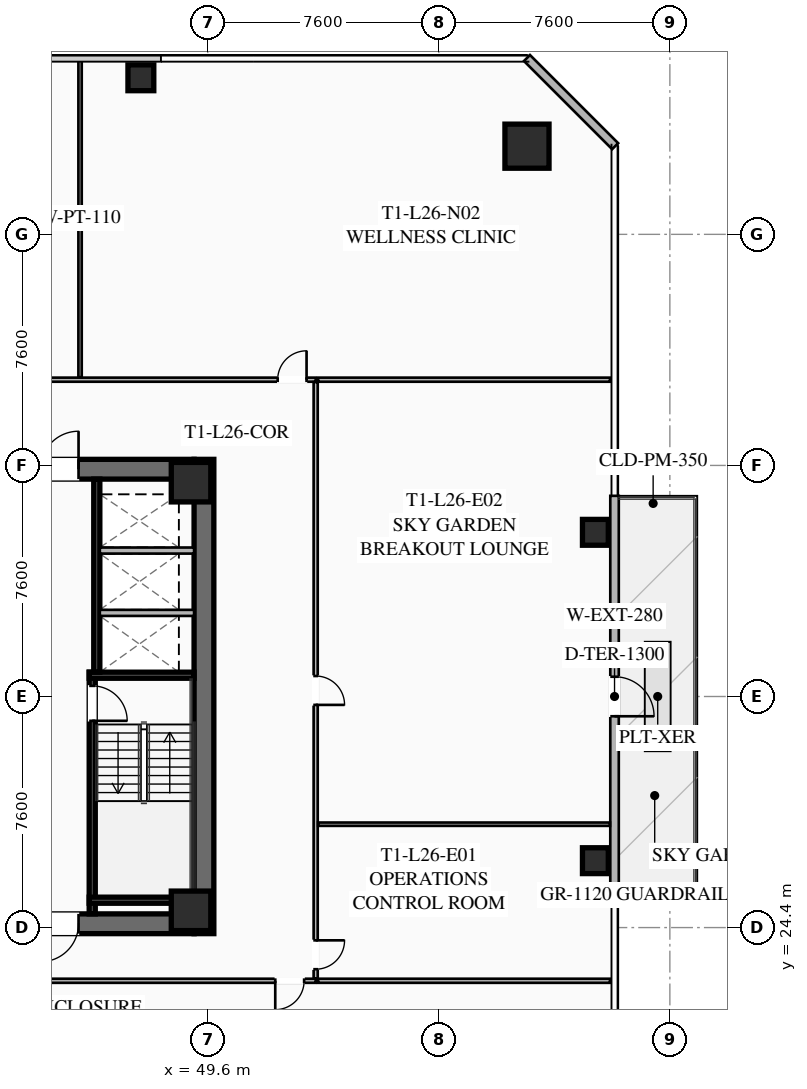
"""IFC4 building model, lengths in metres.
Left out: names, types, materials, properties, quantities, classifications, styles, units other than length and angle.
Written with IfcOpenShell. Run it as: python <this file> out.ifc"""

import sys

from ifc_helpers import new_model, si_unit, direction, frame, frame_2d, origin, origin_2d, place, context, subcontext, project, spatial, rectangle, hollow_rectangle, extrude, element, fill, save


model = new_model("IFC4")
c1 = context("Model", 3, precision=1e-05, world=origin(), true_north=direction((0.0, 1.0)))
c2 = subcontext(c1, "Body", "Model", "MODEL_VIEW")
j1 = project(units=[si_unit("LENGTHUNIT", "METRE"), si_unit("PLANEANGLEUNIT", "RADIAN")], contexts=[c1])
p1 = place(None, origin())
s1 = spatial("IfcSite", under=j1, at=p1, CompositionType="ELEMENT")
p2 = place(p1, origin())
s2 = spatial("IfcBuilding", under=s1, at=p2, CompositionType="ELEMENT")
p3 = place(p2, frame((0.0, 0.0, 99.15)))
s3 = spatial("IfcBuildingStorey", under=s2, at=p3, CompositionType="ELEMENT", Elevation=99.15)
p4 = place(p3, frame((49.475, 39.8, 0.0), z_axis=(0.0, 0.0, 1.0), x_axis=(0.0, -1.0, 0.0)))
e1 = element("IfcWall", 1, at=p4, inside=s3, PredefinedType="SHEAR", context=c2, shape_type="SweptSolid", body=[
    extrude(rectangle(XDim=15.6, YDim=0.65, at=frame_2d((7.8, 0.0))), origin(), (0.0, 0.0, 1.0), 3.55),
])
p5 = place(p3, frame((49.15, 24.525, 0.0), z_axis=(0.0, 0.0, 1.0), x_axis=(-1.0, 0.0, 0.0)))
e2 = element("IfcWall", 2, at=p5, inside=s3, PredefinedType="SHEAR", context=c2, shape_type="SweptSolid", body=[
    extrude(rectangle(XDim=14.3, YDim=0.65, at=frame_2d((7.15, 0.0))), origin(), (0.0, 0.0, 1.0), 3.55),
])
p6 = place(p5, frame((8.85, 0.0, 0.0)))
e3 = element("IfcOpeningElement", 3, at=p6, cuts=e2, PredefinedType="OPENING", context=c2, shape_type="SweptSolid", body=[
    extrude(rectangle(XDim=1.25, YDim=2.25, at=frame_2d((0.625, 1.125))), frame((0.0, 0.335, 0.0), z_axis=(0.0, -1.0, 0.0), x_axis=(1.0, 0.0, 0.0)), (0.0, 0.0, 1.0), 0.67),
])
p7 = place(p5, frame((3.8, 0.0, 0.0)))
e4 = element("IfcOpeningElement", 4, at=p7, cuts=e2, PredefinedType="OPENING", context=c2, shape_type="SweptSolid", body=[
    extrude(rectangle(XDim=1.25, YDim=2.25, at=frame_2d((0.625, 1.125))), frame((0.0, 0.335, 0.0), z_axis=(0.0, -1.0, 0.0), x_axis=(1.0, 0.0, 0.0)), (0.0, 0.0, 1.0), 0.67),
])
p8 = place(p3, frame((34.85, 39.475, 0.0), z_axis=(0.0, 0.0, 1.0), x_axis=(1.0, 0.0, 0.0)))
e5 = element("IfcWall", 5, at=p8, inside=s3, PredefinedType="SHEAR", context=c2, shape_type="SweptSolid", body=[
    extrude(rectangle(XDim=14.3, YDim=0.65, at=frame_2d((7.15, 0.0))), origin(), (0.0, 0.0, 1.0), 3.55),
])
p9 = place(p8, frame((4.2, 0.0, 0.0)))
e6 = element("IfcOpeningElement", 6, at=p9, cuts=e5, PredefinedType="OPENING", context=c2, shape_type="SweptSolid", body=[
    extrude(rectangle(XDim=1.25, YDim=2.25, at=frame_2d((0.625, 1.125))), frame((0.0, 0.335, 0.0), z_axis=(0.0, -1.0, 0.0), x_axis=(1.0, 0.0, 0.0)), (0.0, 0.0, 1.0), 0.67),
])
p10 = place(p8, frame((9.25, 0.0, 0.0)))
e7 = element("IfcOpeningElement", 7, at=p10, cuts=e5, PredefinedType="OPENING", context=c2, shape_type="SweptSolid", body=[
    extrude(rectangle(XDim=1.25, YDim=2.25, at=frame_2d((0.625, 1.125))), frame((0.0, 0.335, 0.0), z_axis=(0.0, -1.0, 0.0), x_axis=(1.0, 0.0, 0.0)), (0.0, 0.0, 1.0), 0.67),
])
for number, where, z_axis, x_axis in (
    (8, (49.05, 24.95, 0.0), (0.0, 0.0, 1.0), (1.0, 0.0, 0.0)),
    (9, (49.05, 39.05, 0.0), (0.0, 0.0, 1.0), (1.0, 0.0, 0.0)),
):
    element("IfcColumn", number, at=place(p3, frame(where, z_axis=z_axis, x_axis=x_axis)), inside=s3, PredefinedType="COLUMN", context=c2, shape_type="SweptSolid", body=[
        extrude(hollow_rectangle(XDim=1.3, YDim=1.3, WallThickness=0.05, at=origin_2d()), origin(), (0.0, 0.0, 1.0), 3.35),
    ])
p11 = place(p3, frame((60.1, 50.1, 0.0), z_axis=(0.0, 0.0, 1.0), x_axis=(1.0, 0.0, 0.0)))
e10 = element("IfcColumn", 10, at=p11, inside=s3, PredefinedType="COLUMN", context=c2, shape_type="SweptSolid", body=[
    extrude(hollow_rectangle(XDim=1.45, YDim=1.45, WallThickness=0.055, at=origin_2d()), origin(), (0.0, 0.0, 1.0), 3.35),
])
for number, where, z_axis, x_axis in (
    (11, (62.35, 26.6, 0.0), (0.0, 0.0, 1.0), (1.0, 0.0, 0.0)),
    (12, (62.35, 37.4, 0.0), (0.0, 0.0, 1.0), (1.0, 0.0, 0.0)),
    (13, (47.4, 52.35, 0.0), (0.0, 0.0, 1.0), (1.0, 0.0, 0.0)),
):
    element("IfcColumn", number, at=place(p3, frame(where, z_axis=z_axis, x_axis=x_axis)), inside=s3, PredefinedType="COLUMN", context=c2, shape_type="SweptSolid", body=[
        extrude(hollow_rectangle(XDim=0.85, YDim=0.85, WallThickness=0.035, at=origin_2d()), origin(), (0.0, 0.0, 1.0), 3.35),
    ])
p12 = place(p3, frame((62.98, 38.6, 0.0), z_axis=(0.0, 0.0, 1.0), x_axis=(0.0, -1.0, 0.0)))
e14 = element("IfcWall", 14, at=p12, inside=s3, PredefinedType="SOLIDWALL", context=c2, shape_type="SweptSolid", body=[
    extrude(rectangle(XDim=13.2, YDim=0.28, at=frame_2d((6.6, 0.0))), origin(), (0.0, 0.0, 1.0), 3.35),
])
p13 = place(p12, frame((5.95, 0.0, 0.0)))
e15 = element("IfcOpeningElement", 15, at=p13, cuts=e14, PredefinedType="OPENING", context=c2, shape_type="SweptSolid", body=[
    extrude(rectangle(XDim=1.3, YDim=2.15, at=frame_2d((0.65, 1.075))), frame((0.0, 0.15, 0.0), z_axis=(0.0, -1.0, 0.0), x_axis=(1.0, 0.0, 0.0)), (0.0, 0.0, 1.0), 0.3),
])
p14 = place(p3, frame((60.1, 53.0, 0.0), z_axis=(0.0, 0.0, 1.0), x_axis=(0.707106781187, -0.707106781187, 0.0)))
e16 = element("IfcWall", 16, at=p14, inside=s3, PredefinedType="SOLIDWALL", context=c2, shape_type="SweptSolid", body=[
    extrude(rectangle(XDim=4.101, YDim=0.28, at=frame_2d((2.051, 0.0))), origin(), (0.0, 0.0, 1.0), 3.35),
])
p15 = place(p3, frame((45.8, 32.8, 0.0), z_axis=(0.0, 0.0, 1.0), x_axis=(0.0, -1.0, 0.0)))
e17 = element("IfcWall", 17, at=p15, inside=s3, PredefinedType="SHEAR", context=c2, shape_type="SweptSolid", body=[
    extrude(rectangle(XDim=7.95, YDim=0.2, at=frame_2d((3.975, 0.0))), origin(), (0.0, 0.0, 1.0), 3.35),
])
p16 = place(p15, frame((0.45, 0.0, 0.0)))
e18 = element("IfcOpeningElement", 18, at=p16, cuts=e17, PredefinedType="OPENING", context=c2, shape_type="SweptSolid", body=[
    extrude(rectangle(XDim=1.15, YDim=2.2, at=frame_2d((0.575, 1.1))), frame((0.0, 0.11, 0.0), z_axis=(0.0, -1.0, 0.0), x_axis=(1.0, 0.0, 0.0)), (0.0, 0.0, 1.0), 0.22),
])
for number, where, z_axis, x_axis in (
    (19, (45.7, 32.7, 0.0), (0.0, 0.0, 1.0), (1.0, 0.0, 0.0)),
    (20, (45.7, 25.3, 0.0), (0.0, 0.0, 1.0), (1.0, 0.0, 0.0)),
):
    element("IfcWall", number, at=place(p3, frame(where, z_axis=z_axis, x_axis=x_axis)), inside=s3, PredefinedType="SHEAR", context=c2, shape_type="SweptSolid", body=[
        extrude(rectangle(XDim=3.45, YDim=0.2, at=frame_2d((1.725, 0.0))), origin(), (0.0, 0.0, 1.0), 3.35),
    ])
p17 = place(p3, frame((45.95, 39.15, 0.0), z_axis=(0.0, 0.0, 1.0), x_axis=(0.0, -1.0, 0.0)))
e21 = element("IfcWall", 21, at=p17, inside=s3, PredefinedType="SHEAR", context=c2, shape_type="SweptSolid", body=[
    extrude(rectangle(XDim=6.35, YDim=0.2, at=frame_2d((3.175, 0.0))), origin(), (0.0, 0.0, 1.0), 3.35),
])
for number, where, z_axis, x_axis in (
    (22, (46.05, 34.75, 0.0), (0.0, 0.0, 1.0), (1.0, 0.0, 0.0)),
    (23, (46.05, 36.8, 0.0), (0.0, 0.0, 1.0), (1.0, 0.0, 0.0)),
):
    element("IfcWall", number, at=place(p3, frame(where, z_axis=z_axis, x_axis=x_axis)), inside=s3, PredefinedType="SOLIDWALL", context=c2, shape_type="SweptSolid", body=[
        extrude(rectangle(XDim=3.1, YDim=0.2, at=frame_2d((1.55, 0.0))), origin(), (0.0, 0.0, 1.0), 3.35),
    ])
p18 = place(p3, frame((24.05, 42.42, 0.0), z_axis=(0.0, 0.0, 1.0), x_axis=(1.0, 0.0, 0.0)))
e24 = element("IfcWall", 24, at=p18, inside=s3, PredefinedType="PARTITIONING", context=c2, shape_type="SweptSolid", body=[
    extrude(rectangle(XDim=29.1, YDim=0.135, at=frame_2d((14.55, 0.0))), origin(), (0.0, 0.0, 1.0), 2.703),
])
p19 = place(p18, frame((0.3, 0.0, 0.0)))
e25 = element("IfcOpeningElement", 25, at=p19, cuts=e24, PredefinedType="OPENING", context=c2, shape_type="SweptSolid", body=[
    extrude(rectangle(XDim=0.95, YDim=2.05, at=frame_2d((0.475, 1.025))), frame((0.0, 0.077, 0.0), z_axis=(0.0, -1.0, 0.0), x_axis=(1.0, 0.0, 0.0)), (0.0, 0.0, 1.0), 0.155),
])
p20 = place(p18, frame((27.85, 0.0, 0.0)))
e26 = element("IfcOpeningElement", 26, at=p20, cuts=e24, PredefinedType="OPENING", context=c2, shape_type="SweptSolid", body=[
    extrude(rectangle(XDim=0.95, YDim=2.05, at=frame_2d((0.475, 1.025))), frame((0.0, 0.077, 0.0), z_axis=(0.0, -1.0, 0.0), x_axis=(1.0, 0.0, 0.0)), (0.0, 0.0, 1.0), 0.155),
])
p21 = place(p3, frame((45.4, 42.5, 0.0), z_axis=(0.0, 0.0, 1.0), x_axis=(0.0, 1.0, 0.0)))
e27 = element("IfcWall", 27, at=p21, inside=s3, PredefinedType="PARTITIONING", context=c2, shape_type="SweptSolid", body=[
    extrude(rectangle(XDim=10.48, YDim=0.11, at=frame_2d((5.24, 0.0))), origin(), (0.0, 0.0, 1.0), 2.703),
])
p22 = place(p3, frame((53.15, 22.65, 0.0), z_axis=(0.0, 0.0, 1.0), x_axis=(-1.0, 0.0, 0.0)))
e28 = element("IfcWall", 28, at=p22, inside=s3, PredefinedType="PARTITIONING", context=c2, shape_type="SweptSolid", body=[
    extrude(rectangle(XDim=29.1, YDim=0.135, at=frame_2d((14.55, 0.0))), origin(), (0.0, 0.0, 1.0), 2.703),
])
p23 = place(p22, frame((27.77, 0.0, 0.0)))
e29 = element("IfcOpeningElement", 29, at=p23, cuts=e28, PredefinedType="OPENING", context=c2, shape_type="SweptSolid", body=[
    extrude(rectangle(XDim=0.95, YDim=2.05, at=frame_2d((0.475, 1.025))), frame((0.0, 0.077, 0.0), z_axis=(0.0, -1.0, 0.0), x_axis=(1.0, 0.0, 0.0)), (0.0, 0.0, 1.0), 0.155),
])
p24 = place(p22, frame((0.38, 0.0, 0.0)))
e30 = element("IfcOpeningElement", 30, at=p24, cuts=e28, PredefinedType="OPENING", context=c2, shape_type="SweptSolid", body=[
    extrude(rectangle(XDim=0.95, YDim=2.05, at=frame_2d((0.475, 1.025))), frame((0.0, 0.077, 0.0), z_axis=(0.0, -1.0, 0.0), x_axis=(1.0, 0.0, 0.0)), (0.0, 0.0, 1.0), 0.155),
])
p25 = place(p3, frame((53.15, 42.34, 0.0), z_axis=(0.0, 0.0, 1.0), x_axis=(0.0, -1.0, 0.0)))
e31 = element("IfcWall", 31, at=p25, inside=s3, PredefinedType="PARTITIONING", context=c2, shape_type="SweptSolid", body=[
    extrude(rectangle(XDim=19.61, YDim=0.135, at=frame_2d((9.805, 0.0))), origin(), (0.0, 0.0, 1.0), 2.703),
])
p26 = place(p25, frame((18.36, 0.0, 0.0)))
e32 = element("IfcOpeningElement", 32, at=p26, cuts=e31, PredefinedType="OPENING", context=c2, shape_type="SweptSolid", body=[
    extrude(rectangle(XDim=0.95, YDim=2.05, at=frame_2d((0.475, 1.025))), frame((0.0, 0.077, 0.0), z_axis=(0.0, -1.0, 0.0), x_axis=(1.0, 0.0, 0.0)), (0.0, 0.0, 1.0), 0.155),
])
p27 = place(p25, frame((9.666, 0.0, 0.0)))
e33 = element("IfcOpeningElement", 33, at=p27, cuts=e31, PredefinedType="OPENING", context=c2, shape_type="SweptSolid", body=[
    extrude(rectangle(XDim=0.95, YDim=2.05, at=frame_2d((0.475, 1.025))), frame((0.0, 0.077, 0.0), z_axis=(0.0, -1.0, 0.0), x_axis=(1.0, 0.0, 0.0)), (0.0, 0.0, 1.0), 0.155),
])
for number, where, z_axis, x_axis in (
    (34, (62.83, 42.42, 0.0), (0.0, 0.0, 1.0), (-1.0, 0.0, 0.0)),
    (35, (53.23, 22.65, 0.0), (0.0, 0.0, 1.0), (1.0, 0.0, 0.0)),
):
    element("IfcWall", number, at=place(p3, frame(where, z_axis=z_axis, x_axis=x_axis)), inside=s3, PredefinedType="PARTITIONING", context=c2, shape_type="SweptSolid", body=[
        extrude(rectangle(XDim=9.6, YDim=0.135, at=frame_2d((4.8, 0.0))), origin(), (0.0, 0.0, 1.0), 2.703),
    ])
p28 = place(p3, frame((53.23, 27.8, 0.0), z_axis=(0.0, 0.0, 1.0), x_axis=(1.0, 0.0, 0.0)))
e36 = element("IfcWall", 36, at=p28, inside=s3, PredefinedType="PARTITIONING", context=c2, shape_type="SweptSolid", body=[
    extrude(rectangle(XDim=9.6, YDim=0.11, at=frame_2d((4.8, 0.0))), origin(), (0.0, 0.0, 1.0), 2.703),
])
p29 = place(p13, origin())
e37 = element("IfcDoor", 37, at=p29, inside=s3, OperationType="SINGLE_SWING_RIGHT", PredefinedType="DOOR", context=c2, shape_type="SweptSolid", body=[
    extrude(rectangle(XDim=1.3, YDim=2.15, at=frame_2d((0.65, 1.075))), frame((0.0, 0.025, 0.0), z_axis=(0.0, -1.0, 0.0), x_axis=(1.0, 0.0, 0.0)), (0.0, 0.0, 1.0), 0.05),
])
fill(e15, e37)
p30 = place(p10, origin())
e38 = element("IfcDoor", 38, at=p30, inside=s3, OperationType="SINGLE_SWING_RIGHT", PredefinedType="DOOR", context=c2, shape_type="SweptSolid", body=[
    extrude(rectangle(XDim=1.25, YDim=2.25, at=frame_2d((0.625, 1.125))), frame((0.0, 0.025, 0.0), z_axis=(0.0, -1.0, 0.0), x_axis=(1.0, 0.0, 0.0)), (0.0, 0.0, 1.0), 0.05),
])
fill(e7, e38)
p31 = place(p7, origin())
e39 = element("IfcDoor", 39, at=p31, inside=s3, OperationType="SINGLE_SWING_RIGHT", PredefinedType="DOOR", context=c2, shape_type="SweptSolid", body=[
    extrude(rectangle(XDim=1.25, YDim=2.25, at=frame_2d((0.625, 1.125))), frame((0.0, 0.025, 0.0), z_axis=(0.0, -1.0, 0.0), x_axis=(1.0, 0.0, 0.0)), (0.0, 0.0, 1.0), 0.05),
])
fill(e4, e39)
p32 = place(p16, origin())
e40 = element("IfcDoor", 40, at=p32, inside=s3, OperationType="SINGLE_SWING_RIGHT", PredefinedType="DOOR", context=c2, shape_type="SweptSolid", body=[
    extrude(rectangle(XDim=1.15, YDim=2.2, at=frame_2d((0.575, 1.1))), frame((0.0, 0.025, 0.0), z_axis=(0.0, -1.0, 0.0), x_axis=(1.0, 0.0, 0.0)), (0.0, 0.0, 1.0), 0.05),
])
fill(e18, e40)
p33 = place(p20, origin())
e41 = element("IfcDoor", 41, at=p33, inside=s3, OperationType="SINGLE_SWING_RIGHT", PredefinedType="DOOR", context=c2, shape_type="SweptSolid", body=[
    extrude(rectangle(XDim=0.95, YDim=2.05, at=frame_2d((0.475, 1.025))), frame((0.0, 0.025, 0.0), z_axis=(0.0, -1.0, 0.0), x_axis=(1.0, 0.0, 0.0)), (0.0, 0.0, 1.0), 0.05),
])
fill(e26, e41)
p34 = place(p24, origin())
e42 = element("IfcDoor", 42, at=p34, inside=s3, OperationType="SINGLE_SWING_RIGHT", PredefinedType="DOOR", context=c2, shape_type="SweptSolid", body=[
    extrude(rectangle(XDim=0.95, YDim=2.05, at=frame_2d((0.475, 1.025))), frame((0.0, 0.025, 0.0), z_axis=(0.0, -1.0, 0.0), x_axis=(1.0, 0.0, 0.0)), (0.0, 0.0, 1.0), 0.05),
])
fill(e30, e42)
p35 = place(p26, origin())
e43 = element("IfcDoor", 43, at=p35, inside=s3, OperationType="SINGLE_SWING_LEFT", PredefinedType="DOOR", context=c2, shape_type="SweptSolid", body=[
    extrude(rectangle(XDim=0.95, YDim=2.05, at=frame_2d((0.475, 1.025))), frame((0.0, 0.025, 0.0), z_axis=(0.0, -1.0, 0.0), x_axis=(1.0, 0.0, 0.0)), (0.0, 0.0, 1.0), 0.05),
])
fill(e32, e43)
p36 = place(p27, origin())
e44 = element("IfcDoor", 44, at=p36, inside=s3, OperationType="SINGLE_SWING_RIGHT", PredefinedType="DOOR", context=c2, shape_type="SweptSolid", body=[
    extrude(rectangle(XDim=0.95, YDim=2.05, at=frame_2d((0.475, 1.025))), frame((0.0, 0.025, 0.0), z_axis=(0.0, -1.0, 0.0), x_axis=(1.0, 0.0, 0.0)), (0.0, 0.0, 1.0), 0.05),
])
fill(e33, e44)
save(model, sys.argv[1])
